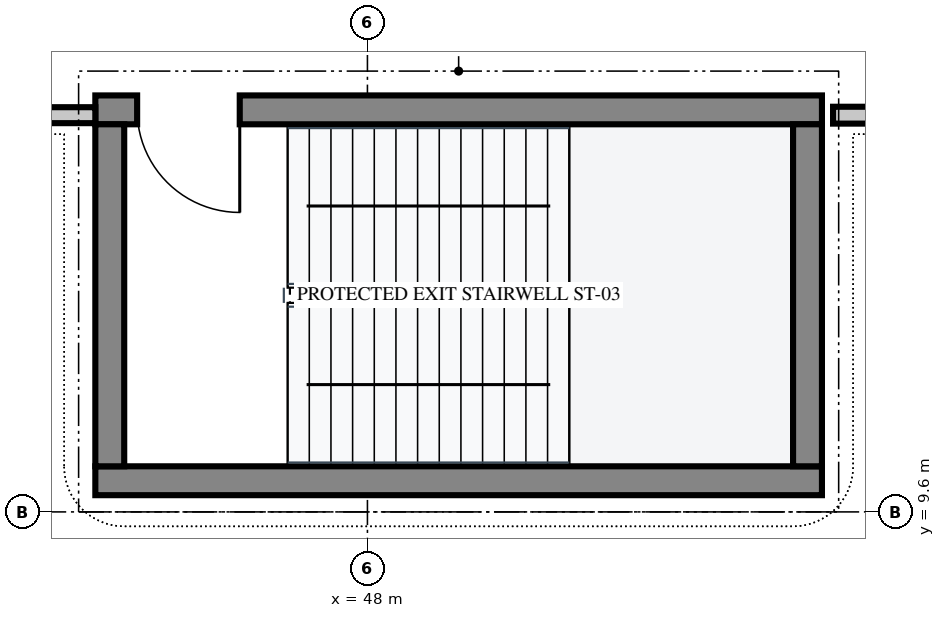
"""IFC4 building model, lengths in metres.
Left out: names, types, materials, properties, quantities, classifications, styles, units other than length and angle.
Written with IfcOpenShell. Run it as: python <this file> out.ifc"""

import sys

from ifc_helpers import new_model, si_unit, direction, frame, frame_2d, origin, place, context, subcontext, project, spatial, rectangle, extrude, element, fill, save


model = new_model("IFC4")
c1 = context("Model", 3, precision=1e-05, world=origin(), true_north=direction((0.0, 1.0)))
c2 = subcontext(c1, "Body", "Model", "MODEL_VIEW")
j1 = project(units=[si_unit("LENGTHUNIT", "METRE"), si_unit("PLANEANGLEUNIT", "RADIAN")], contexts=[c1])
p1 = place(None, origin())
s1 = spatial("IfcSite", under=j1, at=p1, CompositionType="ELEMENT")
p2 = place(p1, origin())
s2 = spatial("IfcBuilding", under=s1, at=p2, CompositionType="ELEMENT")
p3 = place(p2, frame((0.0, 0.0, 5.4)))
s3 = spatial("IfcBuildingStorey", under=s2, at=p3, CompositionType="ELEMENT", Elevation=5.4)
p4 = place(p3, frame((44.42, 10.01, 0.0), z_axis=(0.0, 0.0, 1.0), x_axis=(1.0, 0.0, 0.0)))
e1 = element("IfcWall", 1, at=p4, inside=s3, PredefinedType="SHEAR", context=c2, shape_type="SweptSolid", body=[
    extrude(rectangle(XDim=9.56, YDim=0.38, at=frame_2d((4.78, 0.0))), origin(), (0.0, 0.0, 1.0), 4.505),
])
p5 = place(p3, frame((44.42, 14.89, 0.0), z_axis=(0.0, 0.0, 1.0), x_axis=(1.0, 0.0, 0.0)))
e2 = element("IfcWall", 2, at=p5, inside=s3, PredefinedType="SHEAR", context=c2, shape_type="SweptSolid", body=[
    extrude(rectangle(XDim=9.56, YDim=0.38, at=frame_2d((4.78, 0.0))), origin(), (0.0, 0.0, 1.0), 4.505),
])
p6 = place(p5, frame((0.55, 0.0, 0.0)))
e3 = element("IfcOpeningElement", 3, at=p6, cuts=e2, PredefinedType="OPENING", context=c2, shape_type="SweptSolid", body=[
    extrude(rectangle(XDim=1.35, YDim=2.2, at=frame_2d((0.675, 1.1))), frame((0.0, 0.202, 0.0), z_axis=(0.0, -1.0, 0.0), x_axis=(1.0, 0.0, 0.0)), (0.0, 0.0, 1.0), 0.404),
])
for number, where, z_axis, x_axis in (
    (4, (53.79, 10.2, 0.0), (0.0, 0.0, 1.0), (0.0, 1.0, 0.0)),
    (5, (44.61, 10.2, 0.0), (0.0, 0.0, 1.0), (0.0, 1.0, 0.0)),
):
    element("IfcWall", number, at=place(p3, frame(where, z_axis=z_axis, x_axis=x_axis)), inside=s3, PredefinedType="SHEAR", context=c2, shape_type="SweptSolid", body=[
        extrude(rectangle(XDim=4.5, YDim=0.38, at=frame_2d((2.25, 0.0))), origin(), (0.0, 0.0, 1.0), 4.505),
    ])
p7 = place(p3, frame((54.126, 14.82, 0.0), z_axis=(0.0, 0.0, 1.0), x_axis=(1.0, 0.0, 0.0)))
e6 = element("IfcWall", 6, at=p7, inside=s3, PredefinedType="PARTITIONING", context=c2, shape_type="SweptSolid", body=[
    extrude(rectangle(XDim=12.954, YDim=0.222, at=frame_2d((6.477, 0.0))), origin(), (0.0, 0.0, 1.0), 3.445),
])
p8 = place(p7, frame((6.017, 0.0, 0.0)))
e7 = element("IfcOpeningElement", 7, at=p8, cuts=e6, PredefinedType="OPENING", context=c2, shape_type="SweptSolid", body=[
    extrude(rectangle(XDim=0.92, YDim=2.1, at=frame_2d((0.46, 1.05))), frame((0.0, 0.123, 0.0), z_axis=(0.0, -1.0, 0.0), x_axis=(1.0, 0.0, 0.0)), (0.0, 0.0, 1.0), 0.246),
])
p9 = place(p3, frame((36.12, 14.82, 0.0), z_axis=(0.0, 0.0, 1.0), x_axis=(1.0, 0.0, 0.0)))
e8 = element("IfcWall", 8, at=p9, inside=s3, PredefinedType="PARTITIONING", context=c2, shape_type="SweptSolid", body=[
    extrude(rectangle(XDim=8.3, YDim=0.21, at=frame_2d((4.15, 0.0))), origin(), (0.0, 0.0, 1.0), 4.505),
])
p10 = place(p6, frame((1.35, 0.0, 0.0), z_axis=(0.0, 0.0, 1.0), x_axis=(-1.0, 0.0, 0.0)))
e9 = element("IfcDoor", 9, at=p10, inside=s3, OperationType="SINGLE_SWING_LEFT", PredefinedType="DOOR", context=c2, shape_type="SweptSolid", body=[
    extrude(rectangle(XDim=1.35, YDim=2.2, at=frame_2d((0.675, 1.1))), frame((0.0, 0.025, 0.0), z_axis=(0.0, -1.0, 0.0), x_axis=(1.0, 0.0, 0.0)), (0.0, 0.0, 1.0), 0.05),
])
fill(e3, e9)
save(model, sys.argv[1])
